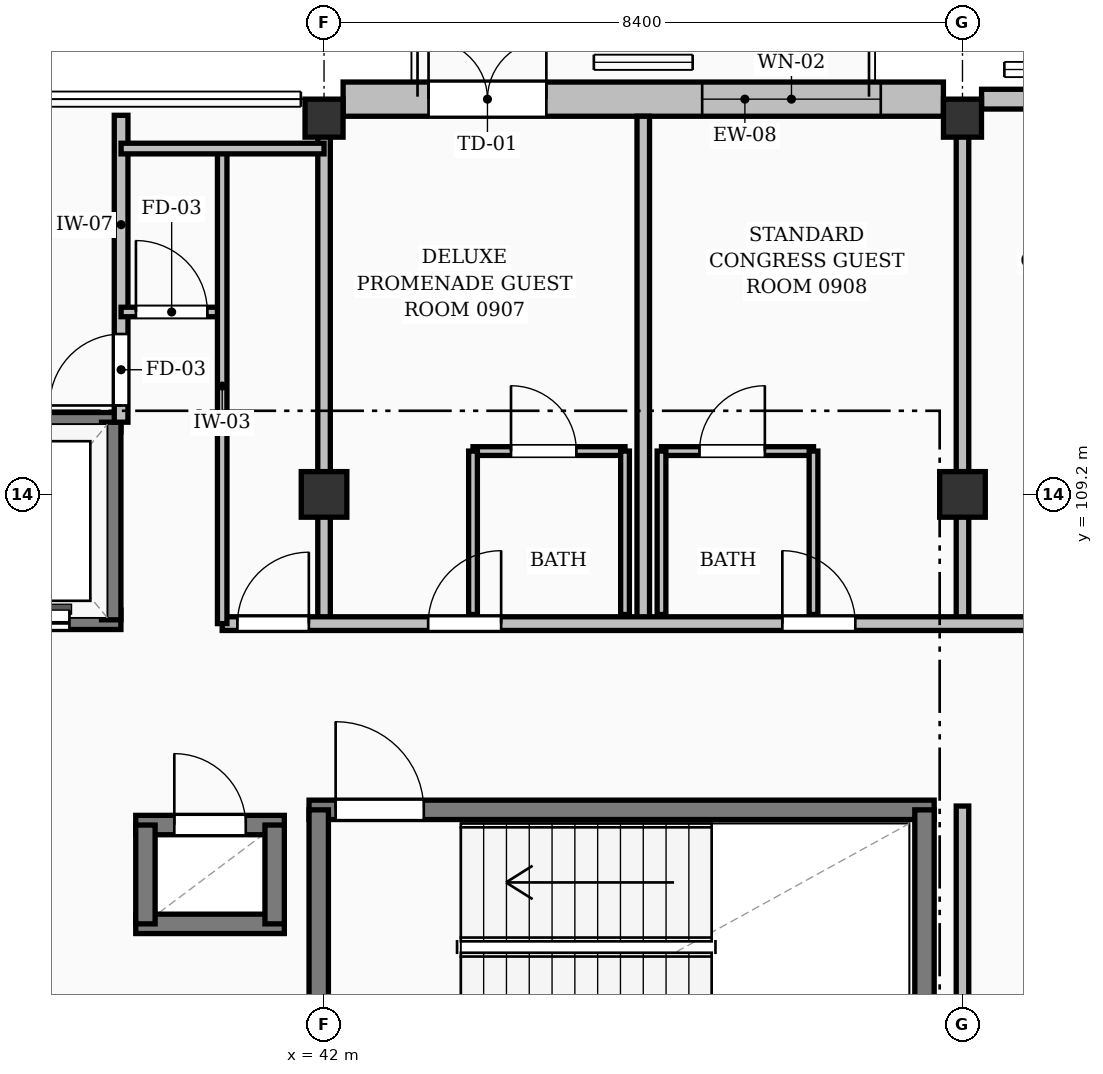
"""IFC4 building model, lengths in metres.
Left out: names, types, materials, properties, quantities, classifications, styles, units other than length and angle.
Written with IfcOpenShell. Run it as: python <this file> out.ifc"""

import sys

from ifc_helpers import new_model, si_unit, direction, frame, frame_2d, origin, origin_2d, place, context, subcontext, project, spatial, rectangle, extrude, element, fill, save


model = new_model("IFC4")
c1 = context("Model", 3, precision=1e-05, world=origin(), true_north=direction((0.0, 1.0)))
c2 = subcontext(c1, "Body", "Model", "MODEL_VIEW")
j1 = project(units=[si_unit("LENGTHUNIT", "METRE"), si_unit("PLANEANGLEUNIT", "RADIAN")], contexts=[c1])
p1 = place(None, origin())
s1 = spatial("IfcSite", under=j1, at=p1, CompositionType="ELEMENT")
p2 = place(p1, origin())
s2 = spatial("IfcBuilding", under=s1, at=p2, CompositionType="ELEMENT")
p3 = place(p2, frame((0.0, 0.0, 31.92)))
s3 = spatial("IfcBuildingStorey", under=s2, at=p3, CompositionType="ELEMENT", Elevation=31.92)
p4 = place(p3, frame((42.0, 109.2, 0.0), z_axis=(0.0, 0.0, 1.0), x_axis=(1.0, 0.0, 0.0)))
e1 = element("IfcColumn", 1, at=p4, inside=s3, PredefinedType="COLUMN", context=c2, shape_type="SweptSolid", body=[
    extrude(rectangle(XDim=0.6, YDim=0.6, at=origin_2d()), origin(), (0.0, 0.0, 1.0), 3.36),
])
p5 = place(p3, frame((42.0, 114.15, 0.0), z_axis=(0.0, 0.0, 1.0), x_axis=(1.0, 0.0, 0.0)))
e2 = element("IfcColumn", 2, at=p5, inside=s3, PredefinedType="COLUMN", context=c2, shape_type="SweptSolid", body=[
    extrude(rectangle(XDim=0.5, YDim=0.5, at=origin_2d()), origin(), (0.0, 0.0, 1.0), 3.36),
])
p6 = place(p3, frame((50.4, 109.2, 0.0), z_axis=(0.0, 0.0, 1.0), x_axis=(1.0, 0.0, 0.0)))
e3 = element("IfcColumn", 3, at=p6, inside=s3, PredefinedType="COLUMN", context=c2, shape_type="SweptSolid", body=[
    extrude(rectangle(XDim=0.6, YDim=0.6, at=origin_2d()), origin(), (0.0, 0.0, 1.0), 3.36),
])
p7 = place(p3, frame((50.4, 114.15, 0.0), z_axis=(0.0, 0.0, 1.0), x_axis=(1.0, 0.0, 0.0)))
e4 = element("IfcColumn", 4, at=p7, inside=s3, PredefinedType="COLUMN", context=c2, shape_type="SweptSolid", body=[
    extrude(rectangle(XDim=0.5, YDim=0.5, at=origin_2d()), origin(), (0.0, 0.0, 1.0), 3.36),
])
p8 = place(p3, frame((42.251, 114.4, 0.0), z_axis=(0.0, 0.0, 1.0), x_axis=(1.0, 0.0, 0.0)))
e5 = element("IfcWall", 5, at=p8, inside=s3, PredefinedType="SOLIDWALL", context=c2, shape_type="SweptSolid", body=[
    extrude(rectangle(XDim=7.898, YDim=0.45, at=frame_2d((3.949, 0.0))), origin(), (0.0, 0.0, 1.0), 2.474),
])
p9 = place(p8, frame((1.124, 0.0, 0.0)))
e6 = element("IfcOpeningElement", 6, at=p9, cuts=e5, PredefinedType="OPENING", context=c2, shape_type="SweptSolid", body=[
    extrude(rectangle(XDim=1.55, YDim=2.08, at=frame_2d((0.775, 1.04))), frame((0.0, 0.235, 0.0), z_axis=(0.0, -1.0, 0.0), x_axis=(1.0, 0.0, 0.0)), (0.0, 0.0, 1.0), 0.47),
])
p10 = place(p8, frame((4.724, 0.0, 0.25)))
e7 = element("IfcOpeningElement", 7, at=p10, cuts=e5, PredefinedType="OPENING", context=c2, shape_type="SweptSolid", body=[
    extrude(rectangle(XDim=2.35, YDim=1.85, at=frame_2d((1.175, 0.925))), frame((0.0, 0.235, 0.0), z_axis=(0.0, -1.0, 0.0), x_axis=(1.0, 0.0, 0.0)), (0.0, 0.0, 1.0), 0.47),
])
p11 = place(p3, frame((50.651, 114.4, 0.0), z_axis=(0.0, 0.0, 1.0), x_axis=(1.0, 0.0, 0.0)))
e8 = element("IfcWall", 8, at=p11, inside=s3, PredefinedType="SOLIDWALL", context=c2, shape_type="SweptSolid", body=[
    extrude(rectangle(XDim=7.898, YDim=0.26, at=frame_2d((3.949, 0.0))), origin(), (0.0, 0.0, 1.0), 2.414),
])
p12 = place(p11, frame((0.724, 0.0, 0.25)))
e9 = element("IfcOpeningElement", 9, at=p12, cuts=e8, PredefinedType="OPENING", context=c2, shape_type="SweptSolid", body=[
    extrude(rectangle(XDim=2.25, YDim=1.95, at=frame_2d((1.125, 0.975))), frame((0.0, 0.14, 0.0), z_axis=(0.0, -1.0, 0.0), x_axis=(1.0, 0.0, 0.0)), (0.0, 0.0, 1.0), 0.28),
])
p13 = place(p11, frame((4.899, 0.0, 0.25)))
e10 = element("IfcOpeningElement", 10, at=p13, cuts=e8, PredefinedType="OPENING", context=c2, shape_type="SweptSolid", body=[
    extrude(rectangle(XDim=2.3, YDim=1.75, at=frame_2d((1.15, 0.875))), frame((0.0, 0.14, 0.0), z_axis=(0.0, -1.0, 0.0), x_axis=(1.0, 0.0, 0.0)), (0.0, 0.0, 1.0), 0.28),
])
p14 = place(p3, frame((41.802, 105.05, 0.0), z_axis=(0.0, 0.0, 1.0), x_axis=(1.0, 0.0, 0.0)))
e11 = element("IfcWall", 11, at=p14, inside=s3, PredefinedType="SOLIDWALL", context=c2, shape_type="SweptSolid", body=[
    extrude(rectangle(XDim=8.225, YDim=0.255, at=frame_2d((4.113, 0.0))), origin(), (0.0, 0.0, 1.0), 3.1),
])
p15 = place(p14, frame((0.35, 0.0, 0.0)))
e12 = element("IfcOpeningElement", 12, at=p15, cuts=e11, PredefinedType="OPENING", context=c2, shape_type="SweptSolid", body=[
    extrude(rectangle(XDim=1.16, YDim=2.15, at=frame_2d((0.58, 1.075))), frame((0.0, 0.137, 0.0), z_axis=(0.0, -1.0, 0.0), x_axis=(1.0, 0.0, 0.0)), (0.0, 0.0, 1.0), 0.275),
])
for number, where, z_axis, x_axis in (
    (13, (41.93, 101.42, 0.0), (0.0, 0.0, 1.0), (0.0, 1.0, 0.0)),
    (14, (49.9, 101.42, 0.0), (0.0, 0.0, 1.0), (0.0, 1.0, 0.0)),
):
    element("IfcWall", number, at=place(p3, frame(where, z_axis=z_axis, x_axis=x_axis)), inside=s3, PredefinedType="SOLIDWALL", context=c2, shape_type="SweptSolid", body=[
        extrude(rectangle(XDim=3.63, YDim=0.255, at=frame_2d((1.815, 0.0))), origin(), (0.0, 0.0, 1.0), 3.1),
    ])
p16 = place(p3, frame((36.873, 107.55, 0.0), z_axis=(0.0, 0.0, 1.0), x_axis=(1.0, 0.0, 0.0)))
e15 = element("IfcWall", 15, at=p16, inside=s3, PredefinedType="SOLIDWALL", context=c2, shape_type="SweptSolid", body=[
    extrude(rectangle(XDim=2.455, YDim=0.255, at=frame_2d((1.228, 0.0))), origin(), (0.0, 0.0, 1.0), 3.1),
])
p17 = place(p16, frame((0.677, 0.0, 0.0)))
e16 = element("IfcOpeningElement", 16, at=p17, cuts=e15, PredefinedType="OPENING", context=c2, shape_type="SweptSolid", body=[
    extrude(rectangle(XDim=1.1, YDim=2.15, at=frame_2d((0.55, 1.075))), frame((0.0, 0.137, 0.0), z_axis=(0.0, -1.0, 0.0), x_axis=(1.0, 0.0, 0.0)), (0.0, 0.0, 1.0), 0.275),
])
p18 = place(p3, frame((36.873, 110.15, 0.0), z_axis=(0.0, 0.0, 1.0), x_axis=(1.0, 0.0, 0.0)))
e17 = element("IfcWall", 17, at=p18, inside=s3, PredefinedType="SOLIDWALL", context=c2, shape_type="SweptSolid", body=[
    extrude(rectangle(XDim=2.455, YDim=0.255, at=frame_2d((1.228, 0.0))), origin(), (0.0, 0.0, 1.0), 3.1),
])
p19 = place(p3, frame((39.2, 107.55, 0.0), z_axis=(0.0, 0.0, 1.0), x_axis=(0.0, 1.0, 0.0)))
e18 = element("IfcWall", 18, at=p19, inside=s3, PredefinedType="SOLIDWALL", context=c2, shape_type="SweptSolid", body=[
    extrude(rectangle(XDim=2.6, YDim=0.255, at=frame_2d((1.3, 0.0))), origin(), (0.0, 0.0, 1.0), 3.1),
])
p20 = place(p3, frame((39.522, 103.55, 0.0), z_axis=(0.0, 0.0, 1.0), x_axis=(1.0, 0.0, 0.0)))
e19 = element("IfcWall", 19, at=p20, inside=s3, PredefinedType="SOLIDWALL", context=c2, shape_type="SweptSolid", body=[
    extrude(rectangle(XDim=1.955, YDim=0.255, at=frame_2d((0.978, 0.0))), origin(), (0.0, 0.0, 1.0), 3.1),
])
p21 = place(p3, frame((39.522, 104.85, 0.0), z_axis=(0.0, 0.0, 1.0), x_axis=(1.0, 0.0, 0.0)))
e20 = element("IfcWall", 20, at=p21, inside=s3, PredefinedType="SOLIDWALL", context=c2, shape_type="SweptSolid", body=[
    extrude(rectangle(XDim=1.955, YDim=0.255, at=frame_2d((0.978, 0.0))), origin(), (0.0, 0.0, 1.0), 3.1),
])
p22 = place(p21, frame((0.508, 0.0, 0.0)))
e21 = element("IfcOpeningElement", 21, at=p22, cuts=e20, PredefinedType="OPENING", context=c2, shape_type="SweptSolid", body=[
    extrude(rectangle(XDim=0.94, YDim=2.1, at=frame_2d((0.47, 1.05))), frame((0.0, 0.137, 0.0), z_axis=(0.0, -1.0, 0.0), x_axis=(1.0, 0.0, 0.0)), (0.0, 0.0, 1.0), 0.275),
])
for number, where, z_axis, x_axis in (
    (22, (39.65, 103.55, 0.0), (0.0, 0.0, 1.0), (0.0, 1.0, 0.0)),
    (23, (41.35, 103.55, 0.0), (0.0, 0.0, 1.0), (0.0, 1.0, 0.0)),
):
    element("IfcWall", number, at=place(p3, frame(where, z_axis=z_axis, x_axis=x_axis)), inside=s3, PredefinedType="SOLIDWALL", context=c2, shape_type="SweptSolid", body=[
        extrude(rectangle(XDim=1.3, YDim=0.255, at=frame_2d((0.65, 0.0))), origin(), (0.0, 0.0, 1.0), 3.1),
    ])
p23 = place(p3, frame((43.96, 109.77, 0.0), z_axis=(0.0, 0.0, 1.0), x_axis=(1.0, 0.0, 0.0)))
e24 = element("IfcWall", 24, at=p23, inside=s3, PredefinedType="PARTITIONING", context=c2, shape_type="SweptSolid", body=[
    extrude(rectangle(XDim=2.0, YDim=0.115, at=frame_2d((1.0, 0.0))), origin(), (0.0, 0.0, 1.0), 3.1),
])
p24 = place(p23, frame((0.5, 0.0, 0.0)))
e25 = element("IfcOpeningElement", 25, at=p24, cuts=e24, PredefinedType="OPENING", context=c2, shape_type="SweptSolid", body=[
    extrude(rectangle(XDim=0.86, YDim=2.05, at=frame_2d((0.43, 1.025))), frame((0.0, 0.067, 0.0), z_axis=(0.0, -1.0, 0.0), x_axis=(1.0, 0.0, 0.0)), (0.0, 0.0, 1.0), 0.135),
])
for number, where, z_axis, x_axis in (
    (26, (43.96, 107.62, 0.0), (0.0, 0.0, 1.0), (0.0, 1.0, 0.0)),
    (27, (45.96, 107.62, 0.0), (0.0, 0.0, 1.0), (0.0, 1.0, 0.0)),
):
    element("IfcWall", number, at=place(p3, frame(where, z_axis=z_axis, x_axis=x_axis)), inside=s3, PredefinedType="PARTITIONING", context=c2, shape_type="SweptSolid", body=[
        extrude(rectangle(XDim=2.15, YDim=0.115, at=frame_2d((1.075, 0.0))), origin(), (0.0, 0.0, 1.0), 3.1),
    ])
p25 = place(p3, frame((46.44, 109.77, 0.0), z_axis=(0.0, 0.0, 1.0), x_axis=(1.0, 0.0, 0.0)))
e28 = element("IfcWall", 28, at=p25, inside=s3, PredefinedType="PARTITIONING", context=c2, shape_type="SweptSolid", body=[
    extrude(rectangle(XDim=2.0, YDim=0.115, at=frame_2d((1.0, 0.0))), origin(), (0.0, 0.0, 1.0), 3.1),
])
p26 = place(p25, frame((0.5, 0.0, 0.0)))
e29 = element("IfcOpeningElement", 29, at=p26, cuts=e28, PredefinedType="OPENING", context=c2, shape_type="SweptSolid", body=[
    extrude(rectangle(XDim=0.86, YDim=2.05, at=frame_2d((0.43, 1.025))), frame((0.0, 0.067, 0.0), z_axis=(0.0, -1.0, 0.0), x_axis=(1.0, 0.0, 0.0)), (0.0, 0.0, 1.0), 0.135),
])
for number, where, z_axis, x_axis in (
    (30, (46.44, 107.62, 0.0), (0.0, 0.0, 1.0), (0.0, 1.0, 0.0)),
    (31, (48.44, 107.62, 0.0), (0.0, 0.0, 1.0), (0.0, 1.0, 0.0)),
):
    element("IfcWall", number, at=place(p3, frame(where, z_axis=z_axis, x_axis=x_axis)), inside=s3, PredefinedType="PARTITIONING", context=c2, shape_type="SweptSolid", body=[
        extrude(rectangle(XDim=2.15, YDim=0.115, at=frame_2d((1.075, 0.0))), origin(), (0.0, 0.0, 1.0), 3.1),
    ])
p27 = place(p3, frame((46.2, 107.5, 0.0), z_axis=(0.0, 0.0, 1.0), x_axis=(0.0, 1.0, 0.0)))
e32 = element("IfcWall", 32, at=p27, inside=s3, PredefinedType="PARTITIONING", context=c2, shape_type="SweptSolid", body=[
    extrude(rectangle(XDim=6.675, YDim=0.165, at=frame_2d((3.337, 0.0))), origin(), (0.0, 0.0, 1.0), 3.1),
])
p28 = place(p3, frame((42.0, 107.5, 0.0), z_axis=(0.0, 0.0, 1.0), x_axis=(0.0, 1.0, 0.0)))
e33 = element("IfcWall", 33, at=p28, inside=s3, PredefinedType="PARTITIONING", context=c2, shape_type="SweptSolid", body=[
    extrude(rectangle(XDim=6.55, YDim=0.165, at=frame_2d((3.275, 0.0))), origin(), (0.0, 0.0, 1.0), 2.39),
])
p29 = place(p3, frame((50.4, 107.5, 0.0), z_axis=(0.0, 0.0, 1.0), x_axis=(0.0, 1.0, 0.0)))
e34 = element("IfcWall", 34, at=p29, inside=s3, PredefinedType="PARTITIONING", context=c2, shape_type="SweptSolid", body=[
    extrude(rectangle(XDim=6.55, YDim=0.165, at=frame_2d((3.275, 0.0))), origin(), (0.0, 0.0, 1.0), 2.33),
])
p30 = place(p3, frame((40.66, 107.5, 0.0), z_axis=(0.0, 0.0, 1.0), x_axis=(1.0, 0.0, 0.0)))
e35 = element("IfcWall", 35, at=p30, inside=s3, PredefinedType="PARTITIONING", context=c2, shape_type="SweptSolid", body=[
    extrude(rectangle(XDim=26.365, YDim=0.18, at=frame_2d((13.183, 0.0))), origin(), (0.0, 0.0, 1.0), 3.1),
])
p31 = place(p30, frame((0.2, 0.0, 0.0)))
e36 = element("IfcOpeningElement", 36, at=p31, cuts=e35, PredefinedType="OPENING", context=c2, shape_type="SweptSolid", body=[
    extrude(rectangle(XDim=0.94, YDim=2.1, at=frame_2d((0.47, 1.05))), frame((0.0, 0.1, 0.0), z_axis=(0.0, -1.0, 0.0), x_axis=(1.0, 0.0, 0.0)), (0.0, 0.0, 1.0), 0.2),
])
p32 = place(p30, frame((2.71, 0.0, 0.0)))
e37 = element("IfcOpeningElement", 37, at=p32, cuts=e35, PredefinedType="OPENING", context=c2, shape_type="SweptSolid", body=[
    extrude(rectangle(XDim=0.96, YDim=2.15, at=frame_2d((0.48, 1.075))), frame((0.0, 0.1, 0.0), z_axis=(0.0, -1.0, 0.0), x_axis=(1.0, 0.0, 0.0)), (0.0, 0.0, 1.0), 0.2),
])
p33 = place(p30, frame((7.37, 0.0, 0.0)))
e38 = element("IfcOpeningElement", 38, at=p33, cuts=e35, PredefinedType="OPENING", context=c2, shape_type="SweptSolid", body=[
    extrude(rectangle(XDim=0.96, YDim=2.15, at=frame_2d((0.48, 1.075))), frame((0.0, 0.1, 0.0), z_axis=(0.0, -1.0, 0.0), x_axis=(1.0, 0.0, 0.0)), (0.0, 0.0, 1.0), 0.2),
])
p34 = place(p30, frame((11.11, 0.0, 0.0)))
e39 = element("IfcOpeningElement", 39, at=p34, cuts=e35, PredefinedType="OPENING", context=c2, shape_type="SweptSolid", body=[
    extrude(rectangle(XDim=0.96, YDim=2.15, at=frame_2d((0.48, 1.075))), frame((0.0, 0.1, 0.0), z_axis=(0.0, -1.0, 0.0), x_axis=(1.0, 0.0, 0.0)), (0.0, 0.0, 1.0), 0.2),
])
p35 = place(p30, frame((15.77, 0.0, 0.0)))
e40 = element("IfcOpeningElement", 40, at=p35, cuts=e35, PredefinedType="OPENING", context=c2, shape_type="SweptSolid", body=[
    extrude(rectangle(XDim=0.96, YDim=2.15, at=frame_2d((0.48, 1.075))), frame((0.0, 0.1, 0.0), z_axis=(0.0, -1.0, 0.0), x_axis=(1.0, 0.0, 0.0)), (0.0, 0.0, 1.0), 0.2),
])
p36 = place(p30, frame((19.64, 0.0, 0.0)))
e41 = element("IfcOpeningElement", 41, at=p36, cuts=e35, PredefinedType="OPENING", context=c2, shape_type="SweptSolid", body=[
    extrude(rectangle(XDim=1.02, YDim=2.15, at=frame_2d((0.51, 1.075))), frame((0.0, 0.1, 0.0), z_axis=(0.0, -1.0, 0.0), x_axis=(1.0, 0.0, 0.0)), (0.0, 0.0, 1.0), 0.2),
])
p37 = place(p3, frame((39.33, 110.15, 0.0), z_axis=(0.0, 0.0, 1.0), x_axis=(0.0, 1.0, 0.0)))
e42 = element("IfcWall", 42, at=p37, inside=s3, PredefinedType="PARTITIONING", context=c2, shape_type="SweptSolid", body=[
    extrude(rectangle(XDim=4.038, YDim=0.18, at=frame_2d((2.019, 0.0))), origin(), (0.0, 0.0, 1.0), 3.1),
])
p38 = place(p37, frame((0.22, 0.0, 0.0)))
e43 = element("IfcOpeningElement", 43, at=p38, cuts=e42, PredefinedType="OPENING", context=c2, shape_type="SweptSolid", body=[
    extrude(rectangle(XDim=0.94, YDim=2.1, at=frame_2d((0.47, 1.05))), frame((0.0, 0.1, 0.0), z_axis=(0.0, -1.0, 0.0), x_axis=(1.0, 0.0, 0.0)), (0.0, 0.0, 1.0), 0.2),
])
p39 = place(p3, frame((39.33, 111.6, 0.0), z_axis=(0.0, 0.0, 1.0), x_axis=(1.0, 0.0, 0.0)))
e44 = element("IfcWall", 44, at=p39, inside=s3, PredefinedType="PARTITIONING", context=c2, shape_type="SweptSolid", body=[
    extrude(rectangle(XDim=1.33, YDim=0.125, at=frame_2d((0.665, 0.0))), origin(), (0.0, 0.0, 1.0), 3.1),
])
p40 = place(p39, frame((0.195, 0.0, 0.0)))
e45 = element("IfcOpeningElement", 45, at=p40, cuts=e44, PredefinedType="OPENING", context=c2, shape_type="SweptSolid", body=[
    extrude(rectangle(XDim=0.94, YDim=2.1, at=frame_2d((0.47, 1.05))), frame((0.0, 0.073, 0.0), z_axis=(0.0, -1.0, 0.0), x_axis=(1.0, 0.0, 0.0)), (0.0, 0.0, 1.0), 0.145),
])
p41 = place(p3, frame((40.66, 107.5, 0.0), z_axis=(0.0, 0.0, 1.0), x_axis=(0.0, 1.0, 0.0)))
e46 = element("IfcWall", 46, at=p41, inside=s3, PredefinedType="PARTITIONING", context=c2, shape_type="SweptSolid", body=[
    extrude(rectangle(XDim=6.25, YDim=0.125, at=frame_2d((3.125, 0.0))), origin(), (0.0, 0.0, 1.0), 3.1),
])
p42 = place(p3, frame((39.33, 113.75, 0.0), z_axis=(0.0, 0.0, 1.0), x_axis=(1.0, 0.0, 0.0)))
e47 = element("IfcWall", 47, at=p42, inside=s3, PredefinedType="PARTITIONING", context=c2, shape_type="SweptSolid", body=[
    extrude(rectangle(XDim=2.67, YDim=0.14, at=frame_2d((1.335, 0.0))), origin(), (0.0, 0.0, 1.0), 3.1),
])
p43 = place(p3, frame((50.4, 92.75, 0.0), z_axis=(0.0, 0.0, 1.0), x_axis=(0.0, 1.0, 0.0)))
e48 = element("IfcWall", 48, at=p43, inside=s3, PredefinedType="PARTITIONING", context=c2, shape_type="SweptSolid", body=[
    extrude(rectangle(XDim=12.35, YDim=0.165, at=frame_2d((6.175, 0.0))), origin(), (0.0, 0.0, 1.0), 2.375),
])
p44 = place(p9, origin())
e49 = element("IfcDoor", 49, at=p44, inside=s3, OperationType="DOUBLE_DOOR_SINGLE_SWING", PredefinedType="DOOR", context=c2, shape_type="SweptSolid", body=[
    extrude(rectangle(XDim=1.55, YDim=2.08, at=frame_2d((0.775, 1.04))), frame((0.0, 0.025, 0.0), z_axis=(0.0, -1.0, 0.0), x_axis=(1.0, 0.0, 0.0)), (0.0, 0.0, 1.0), 0.05),
])
fill(e6, e49)
p45 = place(p10, origin())
e50 = element("IfcWindow", 50, at=p45, inside=s3, PartitioningType="DOUBLE_PANEL_VERTICAL", PredefinedType="WINDOW", context=c2, shape_type="SweptSolid", body=[
    extrude(rectangle(XDim=2.35, YDim=1.85, at=frame_2d((1.175, 0.925))), frame((0.0, 0.03, 0.0), z_axis=(0.0, -1.0, 0.0), x_axis=(1.0, 0.0, 0.0)), (0.0, 0.0, 1.0), 0.06),
])
fill(e7, e50)
p46 = place(p15, origin())
e51 = element("IfcDoor", 51, at=p46, inside=s3, OperationType="SINGLE_SWING_LEFT", PredefinedType="DOOR", context=c2, shape_type="SweptSolid", body=[
    extrude(rectangle(XDim=1.16, YDim=2.15, at=frame_2d((0.58, 1.075))), frame((0.0, 0.025, 0.0), z_axis=(0.0, -1.0, 0.0), x_axis=(1.0, 0.0, 0.0)), (0.0, 0.0, 1.0), 0.05),
])
fill(e12, e51)
p47 = place(p17, origin())
e52 = element("IfcDoor", 52, at=p47, inside=s3, OperationType="DOUBLE_DOOR_SLIDING", PredefinedType="DOOR", context=c2, shape_type="SweptSolid", body=[
    extrude(rectangle(XDim=1.1, YDim=2.15, at=frame_2d((0.55, 1.075))), frame((0.0, 0.025, 0.0), z_axis=(0.0, -1.0, 0.0), x_axis=(1.0, 0.0, 0.0)), (0.0, 0.0, 1.0), 0.05),
])
fill(e16, e52)
p48 = place(p22, origin())
e53 = element("IfcDoor", 53, at=p48, inside=s3, OperationType="SINGLE_SWING_LEFT", PredefinedType="DOOR", context=c2, shape_type="SweptSolid", body=[
    extrude(rectangle(XDim=0.94, YDim=2.1, at=frame_2d((0.47, 1.05))), frame((0.0, 0.025, 0.0), z_axis=(0.0, -1.0, 0.0), x_axis=(1.0, 0.0, 0.0)), (0.0, 0.0, 1.0), 0.05),
])
fill(e21, e53)
p49 = place(p24, origin())
e54 = element("IfcDoor", 54, at=p49, inside=s3, OperationType="SINGLE_SWING_LEFT", PredefinedType="DOOR", context=c2, shape_type="SweptSolid", body=[
    extrude(rectangle(XDim=0.86, YDim=2.05, at=frame_2d((0.43, 1.025))), frame((0.0, 0.025, 0.0), z_axis=(0.0, -1.0, 0.0), x_axis=(1.0, 0.0, 0.0)), (0.0, 0.0, 1.0), 0.05),
])
fill(e25, e54)
p50 = place(p26, origin())
e55 = element("IfcDoor", 55, at=p50, inside=s3, OperationType="SINGLE_SWING_RIGHT", PredefinedType="DOOR", context=c2, shape_type="SweptSolid", body=[
    extrude(rectangle(XDim=0.86, YDim=2.05, at=frame_2d((0.43, 1.025))), frame((0.0, 0.025, 0.0), z_axis=(0.0, -1.0, 0.0), x_axis=(1.0, 0.0, 0.0)), (0.0, 0.0, 1.0), 0.05),
])
fill(e29, e55)
p51 = place(p31, origin())
e56 = element("IfcDoor", 56, at=p51, inside=s3, OperationType="SINGLE_SWING_RIGHT", PredefinedType="DOOR", context=c2, shape_type="SweptSolid", body=[
    extrude(rectangle(XDim=0.94, YDim=2.1, at=frame_2d((0.47, 1.05))), frame((0.0, 0.025, 0.0), z_axis=(0.0, -1.0, 0.0), x_axis=(1.0, 0.0, 0.0)), (0.0, 0.0, 1.0), 0.05),
])
fill(e36, e56)
p52 = place(p32, origin())
e57 = element("IfcDoor", 57, at=p52, inside=s3, OperationType="SINGLE_SWING_RIGHT", PredefinedType="DOOR", context=c2, shape_type="SweptSolid", body=[
    extrude(rectangle(XDim=0.96, YDim=2.15, at=frame_2d((0.48, 1.075))), frame((0.0, 0.025, 0.0), z_axis=(0.0, -1.0, 0.0), x_axis=(1.0, 0.0, 0.0)), (0.0, 0.0, 1.0), 0.05),
])
fill(e37, e57)
p53 = place(p33, origin())
e58 = element("IfcDoor", 58, at=p53, inside=s3, OperationType="SINGLE_SWING_LEFT", PredefinedType="DOOR", context=c2, shape_type="SweptSolid", body=[
    extrude(rectangle(XDim=0.96, YDim=2.15, at=frame_2d((0.48, 1.075))), frame((0.0, 0.025, 0.0), z_axis=(0.0, -1.0, 0.0), x_axis=(1.0, 0.0, 0.0)), (0.0, 0.0, 1.0), 0.05),
])
fill(e38, e58)
p54 = place(p38, origin())
e59 = element("IfcDoor", 59, at=p54, inside=s3, OperationType="SINGLE_SWING_LEFT", PredefinedType="DOOR", context=c2, shape_type="SweptSolid", body=[
    extrude(rectangle(XDim=0.94, YDim=2.1, at=frame_2d((0.47, 1.05))), frame((0.0, 0.025, 0.0), z_axis=(0.0, -1.0, 0.0), x_axis=(1.0, 0.0, 0.0)), (0.0, 0.0, 1.0), 0.05),
])
fill(e43, e59)
p55 = place(p40, origin())
e60 = element("IfcDoor", 60, at=p55, inside=s3, OperationType="SINGLE_SWING_LEFT", PredefinedType="DOOR", context=c2, shape_type="SweptSolid", body=[
    extrude(rectangle(XDim=0.94, YDim=2.1, at=frame_2d((0.47, 1.05))), frame((0.0, 0.025, 0.0), z_axis=(0.0, -1.0, 0.0), x_axis=(1.0, 0.0, 0.0)), (0.0, 0.0, 1.0), 0.05),
])
fill(e45, e60)
save(model, sys.argv[1])
